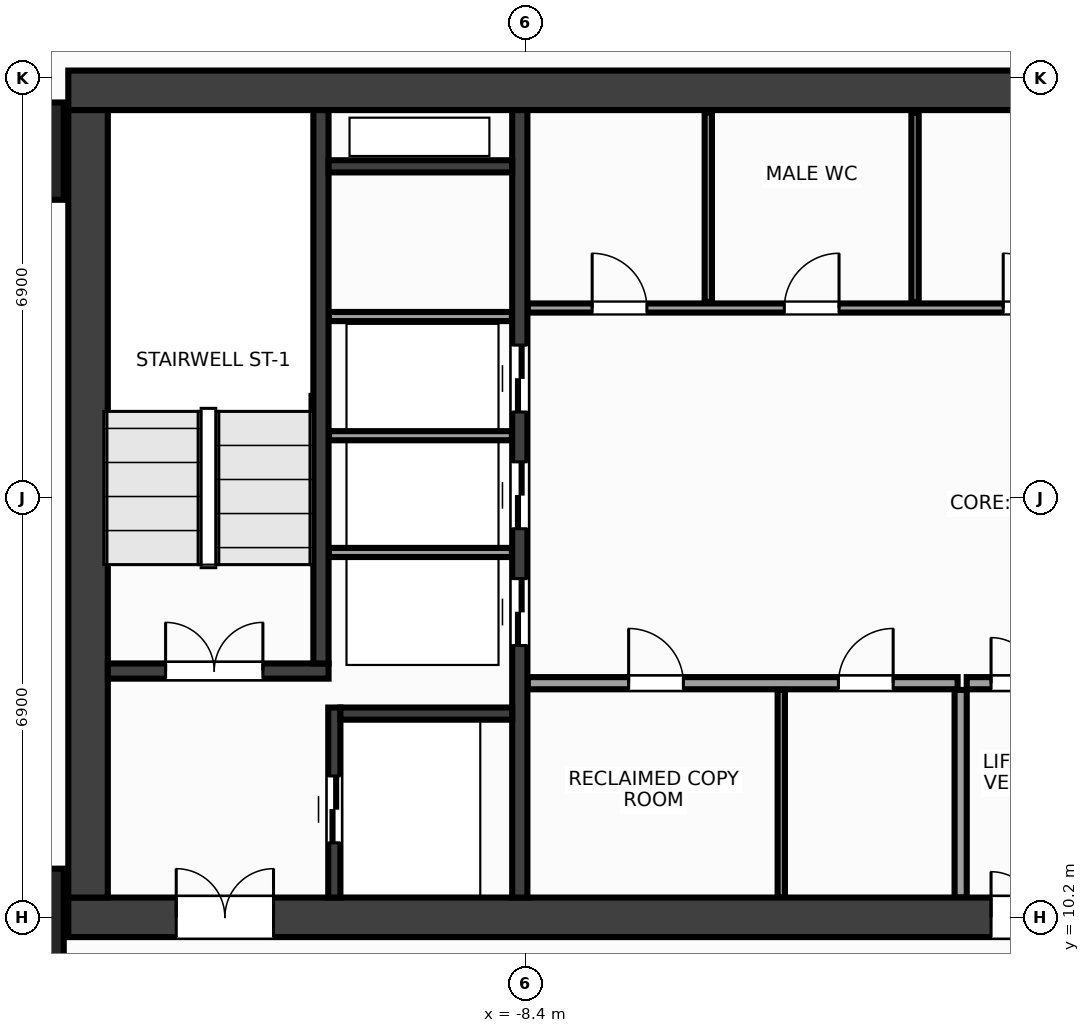
"""IFC4 building model, lengths in metres.
Left out: names, types, materials, properties, quantities, classifications, styles, units other than length and angle.
Written with IfcOpenShell. Run it as: python <this file> out.ifc"""

import sys

from ifc_helpers import new_model, si_unit, direction, frame, frame_2d, origin, origin_2d, place, context, subcontext, project, spatial, rectangle, extrude, source, transform, mapped, element, fill, save


model = new_model("IFC4")
c1 = context("Model", 3, precision=1e-05, world=origin(), true_north=direction((0.0, 1.0)))
c2 = subcontext(c1, "Body", "Model", "MODEL_VIEW")
j1 = project(units=[si_unit("LENGTHUNIT", "METRE"), si_unit("PLANEANGLEUNIT", "RADIAN")], contexts=[c1])
p1 = place(None, origin())
s1 = spatial("IfcSite", under=j1, at=p1, CompositionType="ELEMENT")
p2 = place(p1, origin())
s2 = spatial("IfcBuilding", under=s1, at=p2, CompositionType="ELEMENT")
p3 = place(p2, frame((0.0, 0.0, 156.8)))
s3 = spatial("IfcBuildingStorey", under=s2, at=p3, CompositionType="ELEMENT", Elevation=156.8)
m1 = source(origin(), c2, "Body", "SweptSolid", [
    extrude(rectangle(XDim=31.85, YDim=0.65, at=frame_2d((15.925, 0.0))), origin(), (0.0, 0.0, 1.0), 3.6),
])
p4 = place(p3, frame((-15.925, 23.8, 0.0), z_axis=(0.0, 0.0, 1.0), x_axis=(1.0, 0.0, 0.0)))
e1 = element("IfcWall", 1, at=p4, inside=s3, PredefinedType="SHEAR", context=c2, shape_type="MappedRepresentation", body=[
    mapped(m1, transform((0.0, 0.0, 0.0), x_axis=(1.0, 0.0, 0.0), y_axis=(0.0, 1.0, 0.0), z_axis=(0.0, 0.0, 1.0), scale=1.0)),
])
p5 = place(p3, frame((-15.925, 10.2, 0.0), z_axis=(0.0, 0.0, 1.0), x_axis=(1.0, 0.0, 0.0)))
e2 = element("IfcWall", 2, at=p5, inside=s3, PredefinedType="SHEAR", context=c2, shape_type="MappedRepresentation", body=[
    mapped(m1, transform((0.0, 0.0, 0.0), x_axis=(1.0, 0.0, 0.0), y_axis=(0.0, 1.0, 0.0), z_axis=(0.0, 0.0, 1.0), scale=1.0)),
])
p6 = place(p5, frame((1.775, 0.0, 0.0)))
e3 = element("IfcOpeningElement", 3, at=p6, cuts=e2, PredefinedType="OPENING", context=c2, shape_type="SweptSolid", body=[
    extrude(rectangle(XDim=1.6, YDim=2.15, at=frame_2d((0.8, 1.075))), frame((0.0, 0.337, 0.0), z_axis=(0.0, -1.0, 0.0), x_axis=(1.0, 0.0, 0.0)), (0.0, 0.0, 1.0), 0.674),
])
p7 = place(p5, frame((28.475, 0.0, 0.0)))
e4 = element("IfcOpeningElement", 4, at=p7, cuts=e2, PredefinedType="OPENING", context=c2, shape_type="SweptSolid", body=[
    extrude(rectangle(XDim=1.6, YDim=2.15, at=frame_2d((0.8, 1.075))), frame((0.0, 0.337, 0.0), z_axis=(0.0, -1.0, 0.0), x_axis=(1.0, 0.0, 0.0)), (0.0, 0.0, 1.0), 0.674),
])
p8 = place(p5, frame((15.175, 0.0, 0.0)))
e5 = element("IfcOpeningElement", 5, at=p8, cuts=e2, PredefinedType="OPENING", context=c2, shape_type="SweptSolid", body=[
    extrude(rectangle(XDim=1.5, YDim=2.2, at=frame_2d((0.75, 1.1))), frame((0.0, 0.337, 0.0), z_axis=(0.0, -1.0, 0.0), x_axis=(1.0, 0.0, 0.0)), (0.0, 0.0, 1.0), 0.674),
])
m2 = source(origin(), c2, "Body", "SweptSolid", [
    extrude(rectangle(XDim=12.95, YDim=0.65, at=frame_2d((6.475, 0.0))), origin(), (0.0, 0.0, 1.0), 3.6),
])
p9 = place(p3, frame((-15.6, 10.525, 0.0), z_axis=(0.0, 0.0, 1.0), x_axis=(0.0, 1.0, 0.0)))
e6 = element("IfcWall", 6, at=p9, inside=s3, PredefinedType="SHEAR", context=c2, shape_type="MappedRepresentation", body=[
    mapped(m2, transform((0.0, 0.0, 0.0), x_axis=(1.0, 0.0, 0.0), y_axis=(0.0, 1.0, 0.0), z_axis=(0.0, 0.0, 1.0), scale=1.0)),
])
m3 = source(origin(), c2, "Body", "SweptSolid", [
    extrude(rectangle(XDim=12.95, YDim=0.25, at=frame_2d((6.475, 0.0))), origin(), (0.0, 0.0, 1.0), 3.6),
])
p10 = place(p3, frame((-8.5, 10.525, 0.0), z_axis=(0.0, 0.0, 1.0), x_axis=(0.0, 1.0, 0.0)))
e7 = element("IfcWall", 7, at=p10, inside=s3, PredefinedType="SHEAR", context=c2, shape_type="MappedRepresentation", body=[
    mapped(m3, transform((0.0, 0.0, 0.0), x_axis=(1.0, 0.0, 0.0), y_axis=(0.0, 1.0, 0.0), z_axis=(0.0, 0.0, 1.0), scale=1.0)),
])
p11 = place(p10, frame((4.145, 0.0, 0.0)))
e8 = element("IfcOpeningElement", 8, at=p11, cuts=e7, PredefinedType="OPENING", context=c2, shape_type="SweptSolid", body=[
    extrude(rectangle(XDim=1.1, YDim=2.15, at=frame_2d((0.55, 1.075))), frame((0.0, 0.137, 0.0), z_axis=(0.0, -1.0, 0.0), x_axis=(1.0, 0.0, 0.0)), (0.0, 0.0, 1.0), 0.274),
])
p12 = place(p10, frame((6.065, 0.0, 0.0)))
e9 = element("IfcOpeningElement", 9, at=p12, cuts=e7, PredefinedType="OPENING", context=c2, shape_type="SweptSolid", body=[
    extrude(rectangle(XDim=1.1, YDim=2.15, at=frame_2d((0.55, 1.075))), frame((0.0, 0.137, 0.0), z_axis=(0.0, -1.0, 0.0), x_axis=(1.0, 0.0, 0.0)), (0.0, 0.0, 1.0), 0.274),
])
p13 = place(p10, frame((7.985, 0.0, 0.0)))
e10 = element("IfcOpeningElement", 10, at=p13, cuts=e7, PredefinedType="OPENING", context=c2, shape_type="SweptSolid", body=[
    extrude(rectangle(XDim=1.1, YDim=2.15, at=frame_2d((0.55, 1.075))), frame((0.0, 0.137, 0.0), z_axis=(0.0, -1.0, 0.0), x_axis=(1.0, 0.0, 0.0)), (0.0, 0.0, 1.0), 0.274),
])
m4 = source(origin(), c2, "Body", "SweptSolid", [
    extrude(rectangle(XDim=3.63, YDim=0.25, at=frame_2d((1.815, 0.0))), origin(), (0.0, 0.0, 1.0), 3.6),
])
p14 = place(p3, frame((-15.275, 14.25, 0.0), z_axis=(0.0, 0.0, 1.0), x_axis=(1.0, 0.0, 0.0)))
e11 = element("IfcWall", 11, at=p14, inside=s3, PredefinedType="SHEAR", context=c2, shape_type="MappedRepresentation", body=[
    mapped(m4, transform((0.0, 0.0, 0.0), x_axis=(1.0, 0.0, 0.0), y_axis=(0.0, 1.0, 0.0), z_axis=(0.0, 0.0, 1.0), scale=1.0)),
])
p15 = place(p14, frame((0.95, 0.0, 0.0)))
e12 = element("IfcOpeningElement", 12, at=p15, cuts=e11, PredefinedType="OPENING", context=c2, shape_type="SweptSolid", body=[
    extrude(rectangle(XDim=1.6, YDim=2.15, at=frame_2d((0.8, 1.075))), frame((0.0, 0.137, 0.0), z_axis=(0.0, -1.0, 0.0), x_axis=(1.0, 0.0, 0.0)), (0.0, 0.0, 1.0), 0.274),
])
m5 = source(origin(), c2, "Body", "SweptSolid", [
    extrude(rectangle(XDim=9.1, YDim=0.25, at=frame_2d((4.55, 0.0))), origin(), (0.0, 0.0, 1.0), 3.6),
])
p16 = place(p3, frame((-11.77, 14.375, 0.0), z_axis=(0.0, 0.0, 1.0), x_axis=(0.0, 1.0, 0.0)))
e13 = element("IfcWall", 13, at=p16, inside=s3, PredefinedType="SHEAR", context=c2, shape_type="MappedRepresentation", body=[
    mapped(m5, transform((0.0, 0.0, 0.0), x_axis=(1.0, 0.0, 0.0), y_axis=(0.0, 1.0, 0.0), z_axis=(0.0, 0.0, 1.0), scale=1.0)),
])
m6 = source(origin(), c2, "Body", "SweptSolid", [
    extrude(rectangle(XDim=3.125, YDim=0.2, at=frame_2d((1.562, 0.0))), origin(), (0.0, 0.0, 1.0), 3.6),
])
p17 = place(p3, frame((-11.55, 10.525, 0.0), z_axis=(0.0, 0.0, 1.0), x_axis=(0.0, 1.0, 0.0)))
e14 = element("IfcWall", 14, at=p17, inside=s3, PredefinedType="SHEAR", context=c2, shape_type="MappedRepresentation", body=[
    mapped(m6, transform((0.0, 0.0, 0.0), x_axis=(1.0, 0.0, 0.0), y_axis=(0.0, 1.0, 0.0), z_axis=(0.0, 0.0, 1.0), scale=1.0)),
])
p18 = place(p17, frame((0.9, 0.0, 0.0)))
e15 = element("IfcOpeningElement", 15, at=p18, cuts=e14, PredefinedType="OPENING", context=c2, shape_type="SweptSolid", body=[
    extrude(rectangle(XDim=1.1, YDim=2.15, at=frame_2d((0.55, 1.075))), frame((0.0, 0.112, 0.0), z_axis=(0.0, -1.0, 0.0), x_axis=(1.0, 0.0, 0.0)), (0.0, 0.0, 1.0), 0.224),
])
m7 = source(origin(), c2, "Body", "SweptSolid", [
    extrude(rectangle(XDim=2.825, YDim=0.2, at=frame_2d((1.413, 0.0))), origin(), (0.0, 0.0, 1.0), 3.6),
])
p19 = place(p3, frame((-11.45, 13.55, 0.0), z_axis=(0.0, 0.0, 1.0), x_axis=(1.0, 0.0, 0.0)))
e16 = element("IfcWall", 16, at=p19, inside=s3, PredefinedType="SHEAR", context=c2, shape_type="MappedRepresentation", body=[
    mapped(m7, transform((0.0, 0.0, 0.0), x_axis=(1.0, 0.0, 0.0), y_axis=(0.0, 1.0, 0.0), z_axis=(0.0, 0.0, 1.0), scale=1.0)),
])
m8 = source(origin(), c2, "Body", "SweptSolid", [
    extrude(rectangle(XDim=3.02, YDim=0.2, at=frame_2d((1.51, 0.0))), origin(), (0.0, 0.0, 1.0), 3.6),
])
p20 = place(p3, frame((-11.645, 22.55, 0.0), z_axis=(0.0, 0.0, 1.0), x_axis=(1.0, 0.0, 0.0)))
e17 = element("IfcWall", 17, at=p20, inside=s3, PredefinedType="SHEAR", context=c2, shape_type="MappedRepresentation", body=[
    mapped(m8, transform((0.0, 0.0, 0.0), x_axis=(1.0, 0.0, 0.0), y_axis=(0.0, 1.0, 0.0), z_axis=(0.0, 0.0, 1.0), scale=1.0)),
])
m9 = source(origin(), c2, "Body", "SweptSolid", [
    extrude(rectangle(XDim=1.6, YDim=1.6, at=origin_2d()), origin(), (0.0, 0.0, 1.0), 3.6),
])
for number, where, z_axis, x_axis in (
    (18, (-16.8, 10.2, 0.0), (0.0, 0.0, 1.0), (1.0, 0.0, 0.0)),
    (19, (-16.8, 22.8, 0.0), (0.0, 0.0, 1.0), (1.0, 0.0, 0.0)),
):
    element("IfcColumn", number, at=place(p3, frame(where, z_axis=z_axis, x_axis=x_axis)), inside=s3, PredefinedType="COLUMN", context=c2, shape_type="MappedRepresentation", body=[
        mapped(m9, transform((0.0, 0.0, 0.0), x_axis=(1.0, 0.0, 0.0), y_axis=(0.0, 1.0, 0.0), z_axis=(0.0, 0.0, 1.0), scale=1.0)),
    ])
m10 = source(origin(), c2, "Body", "SweptSolid", [
    extrude(rectangle(XDim=3.01, YDim=0.15, at=frame_2d((1.505, 0.0))), origin(), (0.0, 0.0, 1.0), 3.38),
])
for number, where, z_axis, x_axis in (
    (20, (-11.64, 16.2, 0.0), (0.0, 0.0, 1.0), (1.0, 0.0, 0.0)),
    (21, (-11.64, 18.12, 0.0), (0.0, 0.0, 1.0), (1.0, 0.0, 0.0)),
    (22, (-11.64, 20.08, 0.0), (0.0, 0.0, 1.0), (1.0, 0.0, 0.0)),
):
    element("IfcWall", number, at=place(p3, frame(where, z_axis=z_axis, x_axis=x_axis)), inside=s3, PredefinedType="PARTITIONING", context=c2, shape_type="MappedRepresentation", body=[
        mapped(m10, transform((0.0, 0.0, 0.0), x_axis=(1.0, 0.0, 0.0), y_axis=(0.0, 1.0, 0.0), z_axis=(0.0, 0.0, 1.0), scale=1.0)),
    ])
m11 = source(origin(), c2, "Body", "SweptSolid", [
    extrude(rectangle(XDim=7.07, YDim=0.2, at=frame_2d((3.535, 0.0))), origin(), (0.0, 0.0, 1.0), 3.38),
])
p21 = place(p3, frame((-8.37, 14.05, 0.0), z_axis=(0.0, 0.0, 1.0), x_axis=(1.0, 0.0, 0.0)))
e23 = element("IfcWall", 23, at=p21, inside=s3, PredefinedType="PARTITIONING", context=c2, shape_type="MappedRepresentation", body=[
    mapped(m11, transform((0.0, 0.0, 0.0), x_axis=(1.0, 0.0, 0.0), y_axis=(0.0, 1.0, 0.0), z_axis=(0.0, 0.0, 1.0), scale=1.0)),
])
p22 = place(p21, frame((1.66, 0.0, 0.0)))
e24 = element("IfcOpeningElement", 24, at=p22, cuts=e23, PredefinedType="OPENING", context=c2, shape_type="SweptSolid", body=[
    extrude(rectangle(XDim=0.9, YDim=2.15, at=frame_2d((0.45, 1.075))), frame((0.0, 0.112, 0.0), z_axis=(0.0, -1.0, 0.0), x_axis=(1.0, 0.0, 0.0)), (0.0, 0.0, 1.0), 0.224),
])
p23 = place(p21, frame((5.11, 0.0, 0.0)))
e25 = element("IfcOpeningElement", 25, at=p23, cuts=e23, PredefinedType="OPENING", context=c2, shape_type="SweptSolid", body=[
    extrude(rectangle(XDim=0.9, YDim=2.15, at=frame_2d((0.45, 1.075))), frame((0.0, 0.112, 0.0), z_axis=(0.0, -1.0, 0.0), x_axis=(1.0, 0.0, 0.0)), (0.0, 0.0, 1.0), 0.224),
])
m12 = source(origin(), c2, "Body", "SweptSolid", [
    extrude(rectangle(XDim=3.415, YDim=0.2, at=frame_2d((1.708, 0.0))), origin(), (0.0, 0.0, 1.0), 3.38),
])
p24 = place(p3, frame((-1.25, 10.525, 0.0), z_axis=(0.0, 0.0, 1.0), x_axis=(0.0, 1.0, 0.0)))
e26 = element("IfcWall", 26, at=p24, inside=s3, PredefinedType="PARTITIONING", context=c2, shape_type="MappedRepresentation", body=[
    mapped(m12, transform((0.0, 0.0, 0.0), x_axis=(1.0, 0.0, 0.0), y_axis=(0.0, 1.0, 0.0), z_axis=(0.0, 0.0, 1.0), scale=1.0)),
])
m13 = source(origin(), c2, "Body", "SweptSolid", [
    extrude(rectangle(XDim=2.3, YDim=0.2, at=frame_2d((1.15, 0.0))), origin(), (0.0, 0.0, 1.0), 3.38),
])
p25 = place(p3, frame((-1.15, 14.05, 0.0), z_axis=(0.0, 0.0, 1.0), x_axis=(1.0, 0.0, 0.0)))
e27 = element("IfcWall", 27, at=p25, inside=s3, PredefinedType="PARTITIONING", context=c2, shape_type="MappedRepresentation", body=[
    mapped(m13, transform((0.0, 0.0, 0.0), x_axis=(1.0, 0.0, 0.0), y_axis=(0.0, 1.0, 0.0), z_axis=(0.0, 0.0, 1.0), scale=1.0)),
])
p26 = place(p25, frame((0.4, 0.0, 0.0)))
e28 = element("IfcOpeningElement", 28, at=p26, cuts=e27, PredefinedType="OPENING", context=c2, shape_type="SweptSolid", body=[
    extrude(rectangle(XDim=1.5, YDim=2.2, at=frame_2d((0.75, 1.1))), frame((0.0, 0.112, 0.0), z_axis=(0.0, -1.0, 0.0), x_axis=(1.0, 0.0, 0.0)), (0.0, 0.0, 1.0), 0.224),
])
m14 = source(origin(), c2, "Body", "SweptSolid", [
    extrude(rectangle(XDim=14.59, YDim=0.15, at=frame_2d((7.295, 0.0))), origin(), (0.0, 0.0, 1.0), 3.38),
])
p27 = place(p3, frame((-8.37, 20.22, 0.0), z_axis=(0.0, 0.0, 1.0), x_axis=(1.0, 0.0, 0.0)))
e29 = element("IfcWall", 29, at=p27, inside=s3, PredefinedType="PARTITIONING", context=c2, shape_type="MappedRepresentation", body=[
    mapped(m14, transform((0.0, 0.0, 0.0), x_axis=(1.0, 0.0, 0.0), y_axis=(0.0, 1.0, 0.0), z_axis=(0.0, 0.0, 1.0), scale=1.0)),
])
p28 = place(p27, frame((1.06, 0.0, 0.0)))
e30 = element("IfcOpeningElement", 30, at=p28, cuts=e29, PredefinedType="OPENING", context=c2, shape_type="SweptSolid", body=[
    extrude(rectangle(XDim=0.9, YDim=2.15, at=frame_2d((0.45, 1.075))), frame((0.0, 0.087, 0.0), z_axis=(0.0, -1.0, 0.0), x_axis=(1.0, 0.0, 0.0)), (0.0, 0.0, 1.0), 0.174),
])
p29 = place(p27, frame((4.22, 0.0, 0.0)))
e31 = element("IfcOpeningElement", 31, at=p29, cuts=e29, PredefinedType="OPENING", context=c2, shape_type="SweptSolid", body=[
    extrude(rectangle(XDim=0.9, YDim=2.15, at=frame_2d((0.45, 1.075))), frame((0.0, 0.087, 0.0), z_axis=(0.0, -1.0, 0.0), x_axis=(1.0, 0.0, 0.0)), (0.0, 0.0, 1.0), 0.174),
])
p30 = place(p27, frame((7.82, 0.0, 0.0)))
e32 = element("IfcOpeningElement", 32, at=p30, cuts=e29, PredefinedType="OPENING", context=c2, shape_type="SweptSolid", body=[
    extrude(rectangle(XDim=0.9, YDim=2.15, at=frame_2d((0.45, 1.075))), frame((0.0, 0.087, 0.0), z_axis=(0.0, -1.0, 0.0), x_axis=(1.0, 0.0, 0.0)), (0.0, 0.0, 1.0), 0.174),
])
p31 = place(p27, frame((11.87, 0.0, 0.0)))
e33 = element("IfcOpeningElement", 33, at=p31, cuts=e29, PredefinedType="OPENING", context=c2, shape_type="SweptSolid", body=[
    extrude(rectangle(XDim=0.9, YDim=2.15, at=frame_2d((0.45, 1.075))), frame((0.0, 0.087, 0.0), z_axis=(0.0, -1.0, 0.0), x_axis=(1.0, 0.0, 0.0)), (0.0, 0.0, 1.0), 0.174),
])
m15 = source(origin(), c2, "Body", "SweptSolid", [
    extrude(rectangle(XDim=3.415, YDim=0.12, at=frame_2d((1.708, 0.0))), origin(), (0.0, 0.0, 1.0), 3.38),
])
p32 = place(p3, frame((-4.2, 10.525, 0.0), z_axis=(0.0, 0.0, 1.0), x_axis=(0.0, 1.0, 0.0)))
e34 = element("IfcWall", 34, at=p32, inside=s3, PredefinedType="PARTITIONING", context=c2, shape_type="MappedRepresentation", body=[
    mapped(m15, transform((0.0, 0.0, 0.0), x_axis=(1.0, 0.0, 0.0), y_axis=(0.0, 1.0, 0.0), z_axis=(0.0, 0.0, 1.0), scale=1.0)),
])
m16 = source(origin(), c2, "Body", "SweptSolid", [
    extrude(rectangle(XDim=3.115, YDim=0.12, at=frame_2d((1.558, 0.0))), origin(), (0.0, 0.0, 1.0), 3.38),
])
for number, where, z_axis, x_axis in (
    (35, (-5.4, 20.32, 0.0), (0.0, 0.0, 1.0), (0.0, 1.0, 0.0)),
    (36, (-2.0, 20.32, 0.0), (0.0, 0.0, 1.0), (0.0, 1.0, 0.0)),
):
    element("IfcWall", number, at=place(p3, frame(where, z_axis=z_axis, x_axis=x_axis)), inside=s3, PredefinedType="PARTITIONING", context=c2, shape_type="MappedRepresentation", body=[
        mapped(m16, transform((0.0, 0.0, 0.0), x_axis=(1.0, 0.0, 0.0), y_axis=(0.0, 1.0, 0.0), z_axis=(0.0, 0.0, 1.0), scale=1.0)),
    ])
m17 = source(origin(), c2, "Body", "SweptSolid", [
    extrude(rectangle(XDim=1.6, YDim=2.15, at=frame_2d((0.8, 1.075))), frame((0.0, 0.025, 0.0), z_axis=(0.0, -1.0, 0.0), x_axis=(1.0, 0.0, 0.0)), (0.0, 0.0, 1.0), 0.05),
])
p33 = place(p15, origin())
e37 = element("IfcDoor", 37, at=p33, inside=s3, OperationType="DOUBLE_DOOR_SINGLE_SWING", PredefinedType="DOOR", context=c2, shape_type="MappedRepresentation", body=[
    mapped(m17, transform((0.0, 0.0, 0.0), x_axis=(1.0, 0.0, 0.0), y_axis=(0.0, 1.0, 0.0), z_axis=(0.0, 0.0, 1.0), scale=1.0)),
])
fill(e12, e37)
p34 = place(p6, origin())
e38 = element("IfcDoor", 38, at=p34, inside=s3, OperationType="DOUBLE_DOOR_SINGLE_SWING", PredefinedType="DOOR", context=c2, shape_type="MappedRepresentation", body=[
    mapped(m17, transform((0.0, 0.0, 0.0), x_axis=(1.0, 0.0, 0.0), y_axis=(0.0, 1.0, 0.0), z_axis=(0.0, 0.0, 1.0), scale=1.0)),
])
fill(e3, e38)
m18 = source(origin(), c2, "Body", "SweptSolid", [
    extrude(rectangle(XDim=1.1, YDim=2.15, at=frame_2d((0.55, 1.075))), frame((0.0, 0.025, 0.0), z_axis=(0.0, -1.0, 0.0), x_axis=(1.0, 0.0, 0.0)), (0.0, 0.0, 1.0), 0.05),
])
p35 = place(p18, origin())
e39 = element("IfcDoor", 39, at=p35, inside=s3, OperationType="DOUBLE_DOOR_SLIDING", PredefinedType="DOOR", context=c2, shape_type="MappedRepresentation", body=[
    mapped(m18, transform((0.0, 0.0, 0.0), x_axis=(1.0, 0.0, 0.0), y_axis=(0.0, 1.0, 0.0), z_axis=(0.0, 0.0, 1.0), scale=1.0)),
])
fill(e15, e39)
p36 = place(p11, origin())
e40 = element("IfcDoor", 40, at=p36, inside=s3, OperationType="DOUBLE_DOOR_SLIDING", PredefinedType="DOOR", context=c2, shape_type="MappedRepresentation", body=[
    mapped(m18, transform((0.0, 0.0, 0.0), x_axis=(1.0, 0.0, 0.0), y_axis=(0.0, 1.0, 0.0), z_axis=(0.0, 0.0, 1.0), scale=1.0)),
])
fill(e8, e40)
p37 = place(p12, origin())
e41 = element("IfcDoor", 41, at=p37, inside=s3, OperationType="DOUBLE_DOOR_SLIDING", PredefinedType="DOOR", context=c2, shape_type="MappedRepresentation", body=[
    mapped(m18, transform((0.0, 0.0, 0.0), x_axis=(1.0, 0.0, 0.0), y_axis=(0.0, 1.0, 0.0), z_axis=(0.0, 0.0, 1.0), scale=1.0)),
])
fill(e9, e41)
p38 = place(p13, origin())
e42 = element("IfcDoor", 42, at=p38, inside=s3, OperationType="DOUBLE_DOOR_SLIDING", PredefinedType="DOOR", context=c2, shape_type="MappedRepresentation", body=[
    mapped(m18, transform((0.0, 0.0, 0.0), x_axis=(1.0, 0.0, 0.0), y_axis=(0.0, 1.0, 0.0), z_axis=(0.0, 0.0, 1.0), scale=1.0)),
])
fill(e10, e42)
m19 = source(origin(), c2, "Body", "SweptSolid", [
    extrude(rectangle(XDim=0.9, YDim=2.15, at=frame_2d((0.45, 1.075))), frame((0.0, 0.025, 0.0), z_axis=(0.0, -1.0, 0.0), x_axis=(1.0, 0.0, 0.0)), (0.0, 0.0, 1.0), 0.05),
])
p39 = place(p22, origin())
e43 = element("IfcDoor", 43, at=p39, inside=s3, OperationType="SINGLE_SWING_LEFT", PredefinedType="DOOR", context=c2, shape_type="MappedRepresentation", body=[
    mapped(m19, transform((0.0, 0.0, 0.0), x_axis=(1.0, 0.0, 0.0), y_axis=(0.0, 1.0, 0.0), z_axis=(0.0, 0.0, 1.0), scale=1.0)),
])
fill(e24, e43)
p40 = place(p23, origin())
e44 = element("IfcDoor", 44, at=p40, inside=s3, OperationType="SINGLE_SWING_RIGHT", PredefinedType="DOOR", context=c2, shape_type="MappedRepresentation", body=[
    mapped(m19, transform((0.0, 0.0, 0.0), x_axis=(1.0, 0.0, 0.0), y_axis=(0.0, 1.0, 0.0), z_axis=(0.0, 0.0, 1.0), scale=1.0)),
])
fill(e25, e44)
m20 = source(origin(), c2, "Body", "SweptSolid", [
    extrude(rectangle(XDim=1.5, YDim=2.2, at=frame_2d((0.75, 1.1))), frame((0.0, 0.025, 0.0), z_axis=(0.0, -1.0, 0.0), x_axis=(1.0, 0.0, 0.0)), (0.0, 0.0, 1.0), 0.05),
])
p41 = place(p26, origin())
e45 = element("IfcDoor", 45, at=p41, inside=s3, OperationType="DOUBLE_DOOR_SINGLE_SWING", PredefinedType="DOOR", context=c2, shape_type="MappedRepresentation", body=[
    mapped(m20, transform((0.0, 0.0, 0.0), x_axis=(1.0, 0.0, 0.0), y_axis=(0.0, 1.0, 0.0), z_axis=(0.0, 0.0, 1.0), scale=1.0)),
])
fill(e28, e45)
p42 = place(p8, origin())
e46 = element("IfcDoor", 46, at=p42, inside=s3, OperationType="DOUBLE_DOOR_SINGLE_SWING", PredefinedType="DOOR", context=c2, shape_type="MappedRepresentation", body=[
    mapped(m20, transform((0.0, 0.0, 0.0), x_axis=(1.0, 0.0, 0.0), y_axis=(0.0, 1.0, 0.0), z_axis=(0.0, 0.0, 1.0), scale=1.0)),
])
fill(e5, e46)
p43 = place(p28, origin())
e47 = element("IfcDoor", 47, at=p43, inside=s3, OperationType="SINGLE_SWING_LEFT", PredefinedType="DOOR", context=c2, shape_type="MappedRepresentation", body=[
    mapped(m19, transform((0.0, 0.0, 0.0), x_axis=(1.0, 0.0, 0.0), y_axis=(0.0, 1.0, 0.0), z_axis=(0.0, 0.0, 1.0), scale=1.0)),
])
fill(e30, e47)
p44 = place(p29, origin())
e48 = element("IfcDoor", 48, at=p44, inside=s3, OperationType="SINGLE_SWING_RIGHT", PredefinedType="DOOR", context=c2, shape_type="MappedRepresentation", body=[
    mapped(m19, transform((0.0, 0.0, 0.0), x_axis=(1.0, 0.0, 0.0), y_axis=(0.0, 1.0, 0.0), z_axis=(0.0, 0.0, 1.0), scale=1.0)),
])
fill(e31, e48)
p45 = place(p30, origin())
e49 = element("IfcDoor", 49, at=p45, inside=s3, OperationType="SINGLE_SWING_LEFT", PredefinedType="DOOR", context=c2, shape_type="MappedRepresentation", body=[
    mapped(m19, transform((0.0, 0.0, 0.0), x_axis=(1.0, 0.0, 0.0), y_axis=(0.0, 1.0, 0.0), z_axis=(0.0, 0.0, 1.0), scale=1.0)),
])
fill(e32, e49)
save(model, sys.argv[1])
